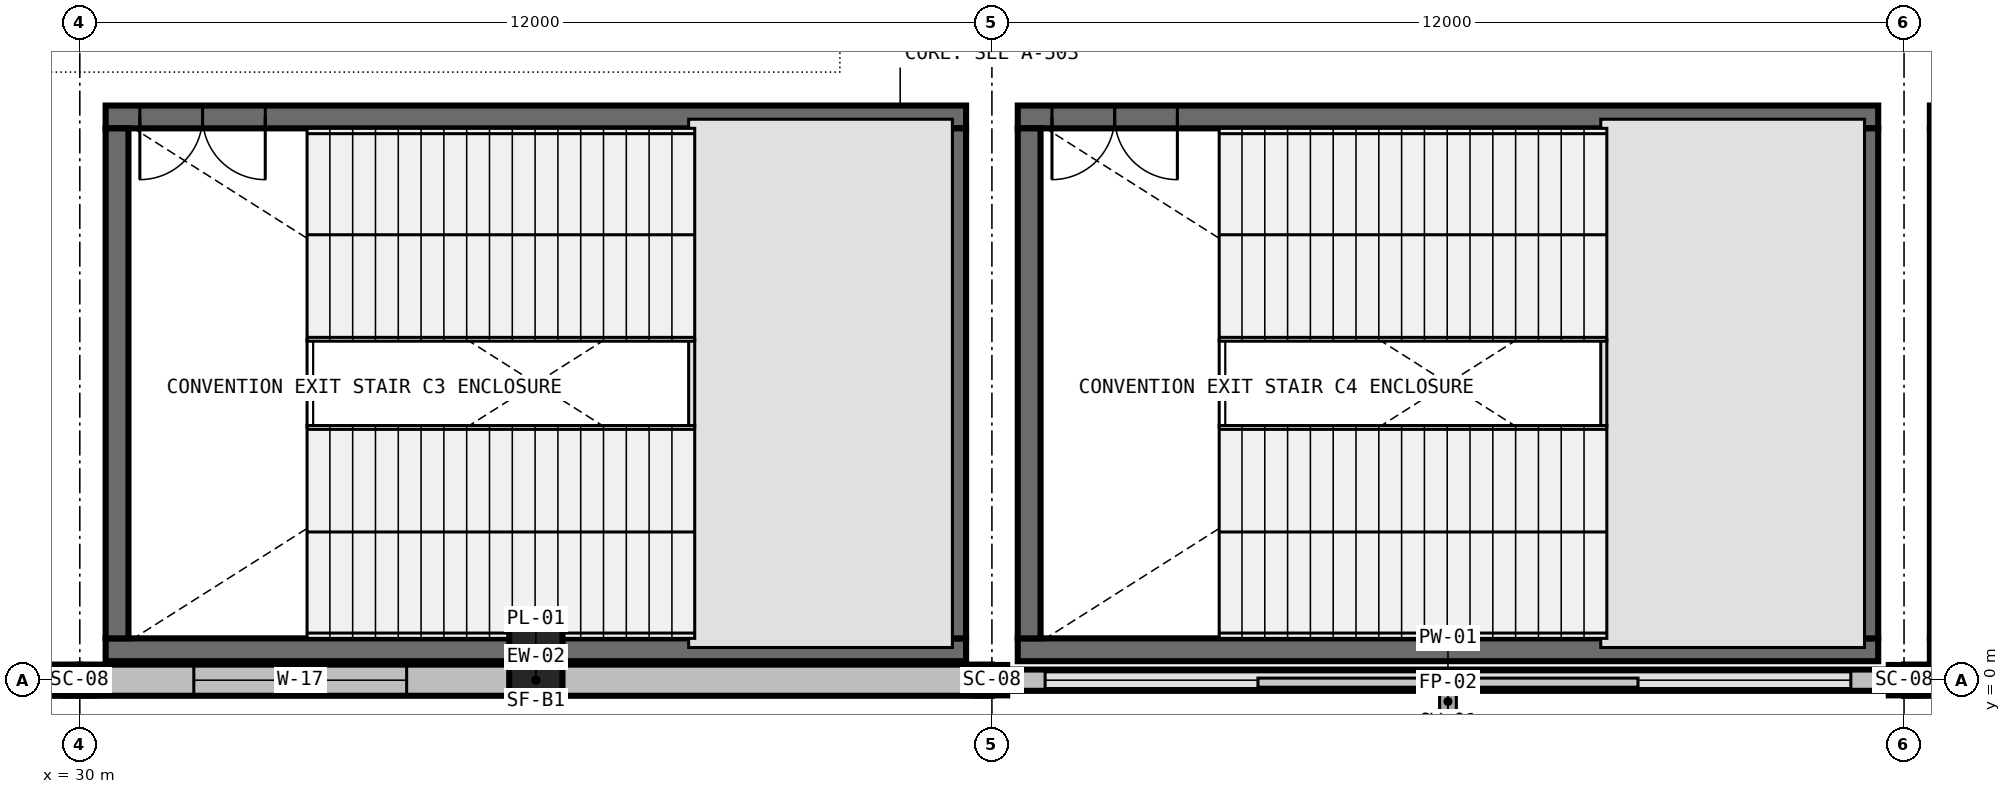
"""IFC4 building model, lengths in metres.
Left out: names, types, materials, properties, quantities, classifications, styles, units other than length and angle.
Written with IfcOpenShell. Run it as: python <this file> out.ifc"""

import sys

from ifc_helpers import new_model, si_unit, direction, frame, frame_2d, origin, origin_2d, place, context, subcontext, project, spatial, rectangle, i_section, extrude, element, fill, save


model = new_model("IFC4")
c1 = context("Model", 3, precision=1e-05, world=origin(), true_north=direction((0.0, 1.0)))
c2 = subcontext(c1, "Body", "Model", "MODEL_VIEW")
j1 = project(units=[si_unit("LENGTHUNIT", "METRE"), si_unit("PLANEANGLEUNIT", "RADIAN")], contexts=[c1])
p1 = place(None, origin())
s1 = spatial("IfcSite", under=j1, at=p1, CompositionType="ELEMENT")
p2 = place(p1, origin())
s2 = spatial("IfcBuilding", under=s1, at=p2, CompositionType="ELEMENT")
p3 = place(p2, frame((0.0, 0.0, 6.0)))
s3 = spatial("IfcBuildingStorey", under=s2, at=p3, CompositionType="ELEMENT", Elevation=6.0)
for number, where, z_axis, x_axis in (
    (1, (30.0, 0.0, 0.0), (0.0, 0.0, 1.0), (1.0, 0.0, 0.0)),
    (2, (42.0, 0.0, 0.0), (0.0, 0.0, 1.0), (1.0, 0.0, 0.0)),
    (3, (54.0, 0.0, 0.0), (0.0, 0.0, 1.0), (1.0, 0.0, 0.0)),
):
    element("IfcColumn", number, at=place(p3, frame(where, z_axis=z_axis, x_axis=x_axis)), inside=s3, PredefinedType="COLUMN", context=c2, shape_type="SweptSolid", body=[
        extrude(i_section(OverallWidth=0.401, OverallDepth=0.399, WebThickness=0.025, FlangeThickness=0.04, FilletRadius=0.031, at=origin_2d()), origin(), (0.0, 0.0, 1.0), 6.0),
    ])
p4 = place(p3, frame((36.0, 0.0, 0.0), z_axis=(0.0, 0.0, 1.0), x_axis=(1.0, 0.0, 0.0)))
e4 = element("IfcColumn", 4, at=p4, inside=s3, PredefinedType="PILASTER", context=c2, shape_type="SweptSolid", body=[
    extrude(rectangle(XDim=0.7, YDim=1.4, at=origin_2d()), origin(), (0.0, 0.0, 1.0), 6.0),
])
p5 = place(p3, frame((41.66, 0.4, 0.0), z_axis=(0.0, 0.0, 1.0), x_axis=(-1.0, 0.0, 0.0)))
e5 = element("IfcWall", 5, at=p5, inside=s3, PredefinedType="SHEAR", context=c2, shape_type="SweptSolid", body=[
    extrude(rectangle(XDim=11.32, YDim=0.3, at=frame_2d((5.66, 0.0))), origin(), (0.0, 0.0, 1.0), 6.0),
])
p6 = place(p3, frame((41.66, 7.41, 0.0), z_axis=(0.0, 0.0, 1.0), x_axis=(-1.0, 0.0, 0.0)))
e6 = element("IfcWall", 6, at=p6, inside=s3, PredefinedType="SHEAR", context=c2, shape_type="SweptSolid", body=[
    extrude(rectangle(XDim=11.32, YDim=0.3, at=frame_2d((5.66, 0.0))), origin(), (0.0, 0.0, 1.0), 6.0),
])
p7 = place(p6, frame((9.22, 0.0, 0.0)))
e7 = element("IfcOpeningElement", 7, at=p7, cuts=e6, PredefinedType="OPENING", context=c2, shape_type="SweptSolid", body=[
    extrude(rectangle(XDim=1.65, YDim=2.25, at=frame_2d((0.825, 1.125))), frame((0.0, 0.165, 0.0), z_axis=(0.0, -1.0, 0.0), x_axis=(1.0, 0.0, 0.0)), (0.0, 0.0, 1.0), 0.33),
])
for number, where, z_axis, x_axis in (
    (8, (30.49, 7.26, 0.0), (0.0, 0.0, 1.0), (0.0, -1.0, 0.0)),
    (9, (41.51, 0.55, 0.0), (0.0, 0.0, 1.0), (0.0, 1.0, 0.0)),
):
    element("IfcWall", number, at=place(p3, frame(where, z_axis=z_axis, x_axis=x_axis)), inside=s3, PredefinedType="SHEAR", context=c2, shape_type="SweptSolid", body=[
        extrude(rectangle(XDim=6.71, YDim=0.3, at=frame_2d((3.355, 0.0))), origin(), (0.0, 0.0, 1.0), 6.0),
    ])
p8 = place(p3, frame((53.66, 0.4, 0.0), z_axis=(0.0, 0.0, 1.0), x_axis=(-1.0, 0.0, 0.0)))
e10 = element("IfcWall", 10, at=p8, inside=s3, PredefinedType="SHEAR", context=c2, shape_type="SweptSolid", body=[
    extrude(rectangle(XDim=11.32, YDim=0.3, at=frame_2d((5.66, 0.0))), origin(), (0.0, 0.0, 1.0), 6.0),
])
p9 = place(p3, frame((53.66, 7.41, 0.0), z_axis=(0.0, 0.0, 1.0), x_axis=(-1.0, 0.0, 0.0)))
e11 = element("IfcWall", 11, at=p9, inside=s3, PredefinedType="SHEAR", context=c2, shape_type="SweptSolid", body=[
    extrude(rectangle(XDim=11.32, YDim=0.3, at=frame_2d((5.66, 0.0))), origin(), (0.0, 0.0, 1.0), 6.0),
])
p10 = place(p9, frame((9.22, 0.0, 0.0)))
e12 = element("IfcOpeningElement", 12, at=p10, cuts=e11, PredefinedType="OPENING", context=c2, shape_type="SweptSolid", body=[
    extrude(rectangle(XDim=1.65, YDim=2.25, at=frame_2d((0.825, 1.125))), frame((0.0, 0.165, 0.0), z_axis=(0.0, -1.0, 0.0), x_axis=(1.0, 0.0, 0.0)), (0.0, 0.0, 1.0), 0.33),
])
for number, where, z_axis, x_axis in (
    (13, (42.49, 7.26, 0.0), (0.0, 0.0, 1.0), (0.0, -1.0, 0.0)),
    (14, (53.51, 0.55, 0.0), (0.0, 0.0, 1.0), (0.0, 1.0, 0.0)),
):
    element("IfcWall", number, at=place(p3, frame(where, z_axis=z_axis, x_axis=x_axis)), inside=s3, PredefinedType="SHEAR", context=c2, shape_type="SweptSolid", body=[
        extrude(rectangle(XDim=6.71, YDim=0.3, at=frame_2d((3.355, 0.0))), origin(), (0.0, 0.0, 1.0), 6.0),
    ])
p11 = place(p3, frame((65.66, 0.4, 0.0), z_axis=(0.0, 0.0, 1.0), x_axis=(-1.0, 0.0, 0.0)))
e15 = element("IfcWall", 15, at=p11, inside=s3, PredefinedType="SHEAR", context=c2, shape_type="SweptSolid", body=[
    extrude(rectangle(XDim=11.32, YDim=0.3, at=frame_2d((5.66, 0.0))), origin(), (0.0, 0.0, 1.0), 6.0),
])
p12 = place(p3, frame((65.66, 7.41, 0.0), z_axis=(0.0, 0.0, 1.0), x_axis=(-1.0, 0.0, 0.0)))
e16 = element("IfcWall", 16, at=p12, inside=s3, PredefinedType="SHEAR", context=c2, shape_type="SweptSolid", body=[
    extrude(rectangle(XDim=11.32, YDim=0.3, at=frame_2d((5.66, 0.0))), origin(), (0.0, 0.0, 1.0), 6.0),
])
p13 = place(p12, frame((9.22, 0.0, 0.0)))
e17 = element("IfcOpeningElement", 17, at=p13, cuts=e16, PredefinedType="OPENING", context=c2, shape_type="SweptSolid", body=[
    extrude(rectangle(XDim=1.65, YDim=2.25, at=frame_2d((0.825, 1.125))), frame((0.0, 0.165, 0.0), z_axis=(0.0, -1.0, 0.0), x_axis=(1.0, 0.0, 0.0)), (0.0, 0.0, 1.0), 0.33),
])
p14 = place(p3, frame((54.49, 7.26, 0.0), z_axis=(0.0, 0.0, 1.0), x_axis=(0.0, -1.0, 0.0)))
e18 = element("IfcWall", 18, at=p14, inside=s3, PredefinedType="SHEAR", context=c2, shape_type="SweptSolid", body=[
    extrude(rectangle(XDim=6.71, YDim=0.3, at=frame_2d((3.355, 0.0))), origin(), (0.0, 0.0, 1.0), 6.0),
])
p15 = place(p3, frame((24.0, 0.0, 0.0), z_axis=(0.0, 0.0, 1.0), x_axis=(1.0, 0.0, 0.0)))
e19 = element("IfcWall", 19, at=p15, inside=s3, PredefinedType="STANDARD", context=c2, shape_type="SweptSolid", body=[
    extrude(rectangle(XDim=6.0, YDim=0.41, at=frame_2d((3.0, 0.0))), origin(), (0.0, 0.0, 1.0), 4.676),
])
p16 = place(p3, frame((30.0, 0.0, 0.0), z_axis=(0.0, 0.0, 1.0), x_axis=(1.0, 0.0, 0.0)))
e20 = element("IfcWall", 20, at=p16, inside=s3, PredefinedType="STANDARD", context=c2, shape_type="SweptSolid", body=[
    extrude(rectangle(XDim=12.0, YDim=0.41, at=frame_2d((6.0, 0.0))), origin(), (0.0, 0.0, 1.0), 4.676),
])
p17 = place(p16, frame((1.5, 0.0, 0.85)))
e21 = element("IfcOpeningElement", 21, at=p17, cuts=e20, PredefinedType="OPENING", context=c2, shape_type="SweptSolid", body=[
    extrude(rectangle(XDim=2.8, YDim=2.4, at=frame_2d((1.4, 1.2))), frame((0.0, 0.22, 0.0), z_axis=(0.0, -1.0, 0.0), x_axis=(1.0, 0.0, 0.0)), (0.0, 0.0, 1.0), 0.44),
])
p18 = place(p3, frame((42.0, 0.0, 0.0), z_axis=(0.0, 0.0, 1.0), x_axis=(1.0, 0.0, 0.0)))
e22 = element("IfcWall", 22, at=p18, inside=s3, PredefinedType="PARAPET", context=c2, shape_type="SweptSolid", body=[
    extrude(rectangle(XDim=12.0, YDim=0.28, at=frame_2d((6.0, 0.0))), origin(), (0.0, 0.0, 1.0), 0.2),
])
p19 = place(p3, frame((54.0, 0.0, 0.0), z_axis=(0.0, 0.0, 1.0), x_axis=(1.0, 0.0, 0.0)))
e23 = element("IfcWall", 23, at=p19, inside=s3, PredefinedType="STANDARD", context=c2, shape_type="SweptSolid", body=[
    extrude(rectangle(XDim=12.0, YDim=0.41, at=frame_2d((6.0, 0.0))), origin(), (0.0, 0.0, 1.0), 4.676),
])
p20 = place(p19, frame((1.5, 0.0, 0.85)))
e24 = element("IfcOpeningElement", 24, at=p20, cuts=e23, PredefinedType="OPENING", context=c2, shape_type="SweptSolid", body=[
    extrude(rectangle(XDim=2.2, YDim=1.95, at=frame_2d((1.1, 0.975))), frame((0.0, 0.22, 0.0), z_axis=(0.0, -1.0, 0.0), x_axis=(1.0, 0.0, 0.0)), (0.0, 0.0, 1.0), 0.44),
])
p21 = place(p7, origin())
e25 = element("IfcDoor", 25, at=p21, inside=s3, OperationType="DOUBLE_DOOR_SINGLE_SWING", PredefinedType="DOOR", context=c2, shape_type="SweptSolid", body=[
    extrude(rectangle(XDim=1.65, YDim=2.25, at=frame_2d((0.825, 1.125))), frame((0.0, 0.025, 0.0), z_axis=(0.0, -1.0, 0.0), x_axis=(1.0, 0.0, 0.0)), (0.0, 0.0, 1.0), 0.05),
])
fill(e7, e25)
p22 = place(p10, origin())
e26 = element("IfcDoor", 26, at=p22, inside=s3, OperationType="DOUBLE_DOOR_SINGLE_SWING", PredefinedType="DOOR", context=c2, shape_type="SweptSolid", body=[
    extrude(rectangle(XDim=1.65, YDim=2.25, at=frame_2d((0.825, 1.125))), frame((0.0, 0.025, 0.0), z_axis=(0.0, -1.0, 0.0), x_axis=(1.0, 0.0, 0.0)), (0.0, 0.0, 1.0), 0.05),
])
fill(e12, e26)
p23 = place(p17, origin())
e27 = element("IfcWindow", 27, at=p23, inside=s3, PartitioningType="DOUBLE_PANEL_VERTICAL", PredefinedType="WINDOW", context=c2, shape_type="SweptSolid", body=[
    extrude(rectangle(XDim=2.8, YDim=2.4, at=frame_2d((1.4, 1.2))), frame((0.0, 0.03, 0.0), z_axis=(0.0, -1.0, 0.0), x_axis=(1.0, 0.0, 0.0)), (0.0, 0.0, 1.0), 0.06),
])
fill(e21, e27)
save(model, sys.argv[1])
